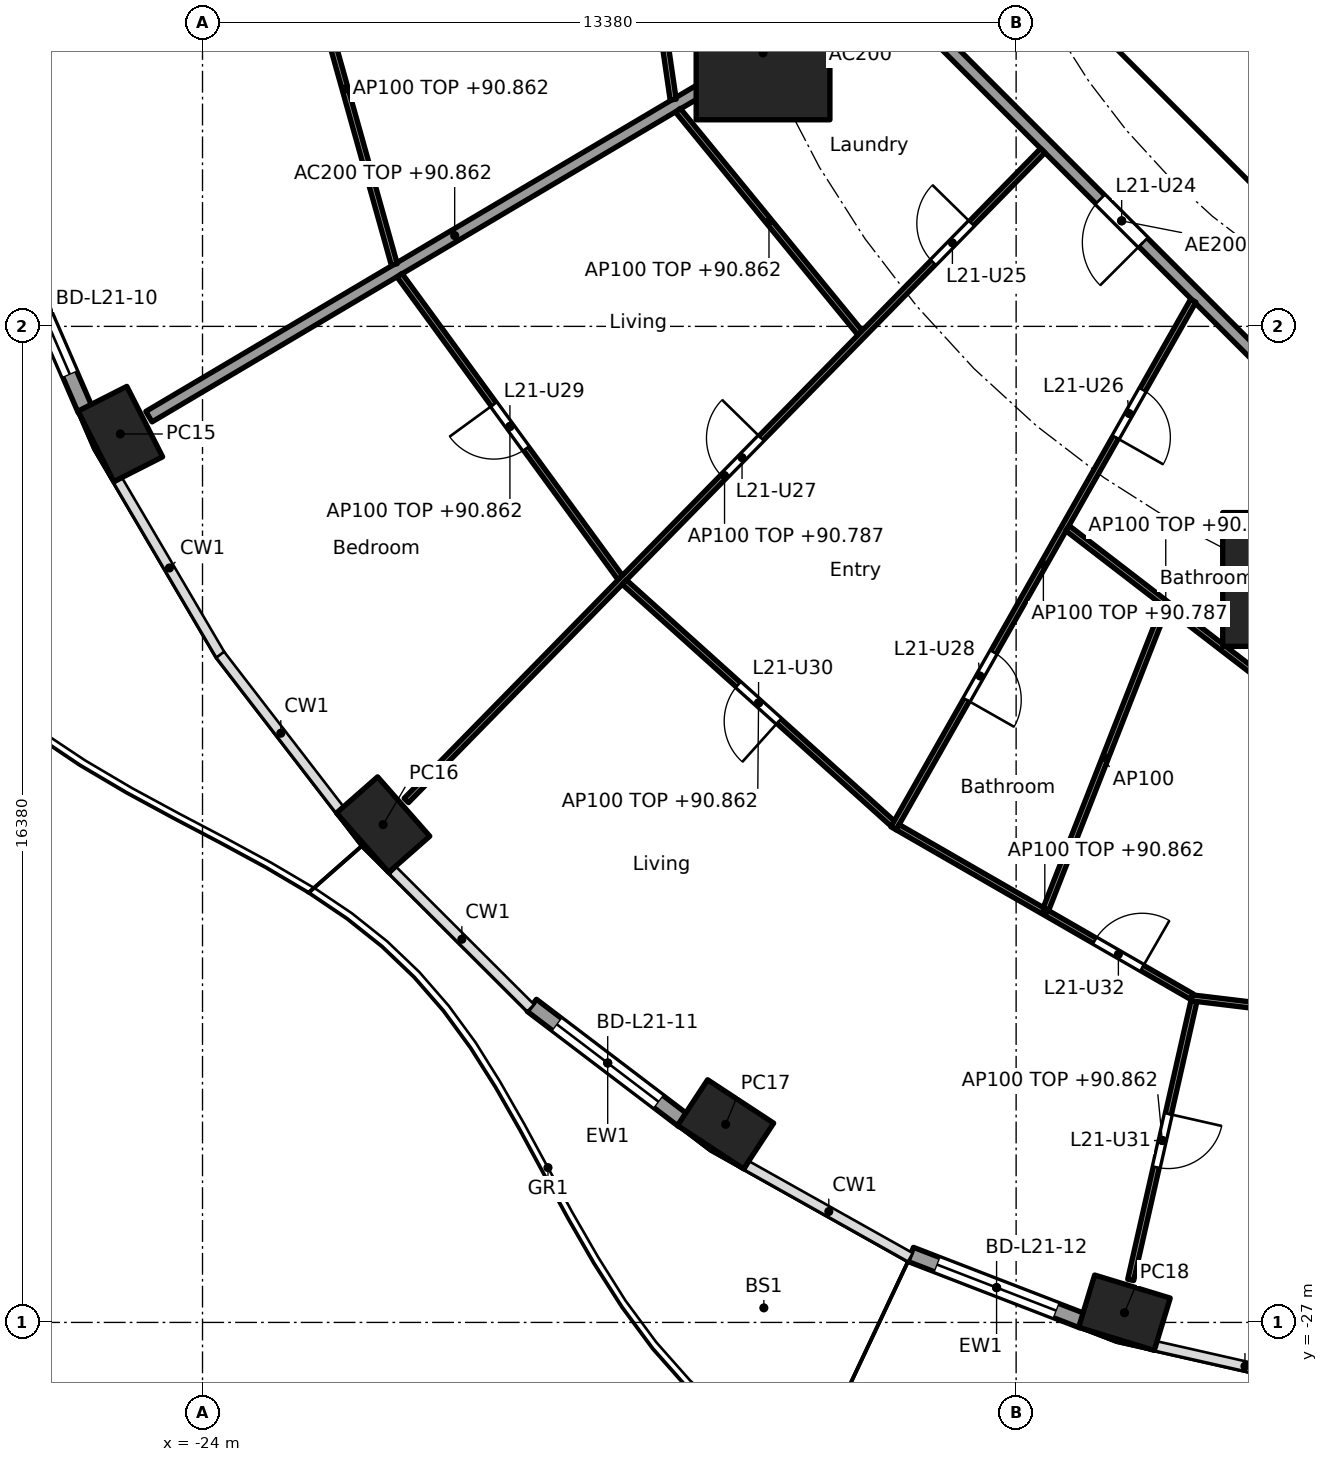
"""IFC4 building model, lengths in metres.
Left out: names, types, materials, properties, quantities, classifications, styles, units other than length and angle.
Written with IfcOpenShell. Run it as: python <this file> out.ifc"""

import sys

from ifc_helpers import new_model, si_unit, direction, frame, frame_2d, origin, origin_2d, place, context, subcontext, project, spatial, rectangle, hollow_rectangle, extrude, element, fill, save


model = new_model("IFC4")
c1 = context("Model", 3, precision=1e-05, world=origin(), true_north=direction((0.0, 1.0)))
c2 = subcontext(c1, "Body", "Model", "MODEL_VIEW")
j1 = project(units=[si_unit("LENGTHUNIT", "METRE"), si_unit("PLANEANGLEUNIT", "RADIAN")], contexts=[c1])
p1 = place(None, origin())
s1 = spatial("IfcSite", under=j1, at=p1, CompositionType="ELEMENT")
p2 = place(p1, origin())
s2 = spatial("IfcBuilding", under=s1, at=p2, CompositionType="ELEMENT")
p3 = place(p2, frame((0.0, 0.0, 88.1)))
s3 = spatial("IfcBuildingStorey", under=s2, at=p3, CompositionType="ELEMENT", Elevation=88.1)
for number, where, z_axis, x_axis in (
    (1, (-25.352, -12.39, 0.0), (0.0, 0.0, 1.0), (0.452, -0.892, 0.0)),
    (2, (-21.03, -18.813, 0.0), (0.0, 0.0, 1.0), (0.66, -0.751, 0.0)),
    (3, (-15.397, -23.742, 0.0), (0.0, 0.0, 1.0), (0.836, -0.549, 0.0)),
    (4, (-8.839, -26.841, 0.0), (0.0, 0.0, 1.0), (0.957, -0.292, 0.0)),
):
    element("IfcColumn", number, at=place(p3, frame(where, z_axis=z_axis, x_axis=x_axis)), inside=s3, PredefinedType="COLUMN", context=c2, shape_type="SweptSolid", body=[
        extrude(hollow_rectangle(XDim=1.3, YDim=0.9, WallThickness=0.045, at=origin_2d()), origin(), (0.0, 0.0, 1.0), 3.7),
    ])
for number, where, z_axis, x_axis in (
    (5, (-14.782, -6.123, 0.0), (0.0, 0.0, 1.0), (1.0, 0.0, 0.0)),
    (6, (-6.123, -14.782, 0.0), (0.0, 0.0, 1.0), (1.0, 0.0, 0.0)),
):
    element("IfcColumn", number, at=place(p3, frame(where, z_axis=z_axis, x_axis=x_axis)), inside=s3, PredefinedType="COLUMN", context=c2, shape_type="SweptSolid", body=[
        extrude(rectangle(XDim=2.2, YDim=2.2, at=origin_2d()), origin(), (0.0, 0.0, 1.0), 3.7),
    ])
p4 = place(p3, frame((-25.928, -11.994, 0.0), z_axis=(0.0, 0.0, 1.0), x_axis=(-0.397682447205, 0.917523117521, 0.0)))
e7 = element("IfcWall", 7, at=p4, inside=s3, PredefinedType="SOLIDWALL", context=c2, shape_type="SweptSolid", body=[
    extrude(rectangle(XDim=3.38, YDim=0.25, at=frame_2d((1.69, 0.0))), origin(), (0.0, 0.0, 1.0), 3.44),
])
p5 = place(p4, frame((0.64, 0.0, 0.0)))
e8 = element("IfcOpeningElement", 8, at=p5, cuts=e7, PredefinedType="OPENING", context=c2, shape_type="SweptSolid", body=[
    extrude(rectangle(XDim=2.1, YDim=2.4, at=frame_2d((1.05, 1.2))), frame((0.0, 0.135, 0.0), z_axis=(0.0, -1.0, 0.0), x_axis=(1.0, 0.0, 0.0)), (0.0, 0.0, 1.0), 0.27),
])
p6 = place(p3, frame((-16.089, -23.682, 0.0), z_axis=(0.0, 0.0, 1.0), x_axis=(-0.796037575978, 0.605247203736, 0.0)))
e9 = element("IfcWall", 9, at=p6, inside=s3, PredefinedType="SOLIDWALL", context=c2, shape_type="SweptSolid", body=[
    extrude(rectangle(XDim=3.134, YDim=0.25, at=frame_2d((1.567, 0.0))), origin(), (0.0, 0.0, 1.0), 3.44),
])
p7 = place(p6, frame((0.517, 0.0, 0.0)))
e10 = element("IfcOpeningElement", 10, at=p7, cuts=e9, PredefinedType="OPENING", context=c2, shape_type="SweptSolid", body=[
    extrude(rectangle(XDim=2.1, YDim=2.4, at=frame_2d((1.05, 1.2))), frame((0.0, 0.135, 0.0), z_axis=(0.0, -1.0, 0.0), x_axis=(1.0, 0.0, 0.0)), (0.0, 0.0, 1.0), 0.27),
])
p8 = place(p3, frame((-9.529, -26.973, 0.0), z_axis=(0.0, 0.0, 1.0), x_axis=(-0.932827091302, 0.360324322982, 0.0)))
e11 = element("IfcWall", 11, at=p8, inside=s3, PredefinedType="SOLIDWALL", context=c2, shape_type="SweptSolid", body=[
    extrude(rectangle(XDim=3.027, YDim=0.25, at=frame_2d((1.514, 0.0))), origin(), (0.0, 0.0, 1.0), 3.44),
])
p9 = place(p8, frame((0.464, 0.0, 0.0)))
e12 = element("IfcOpeningElement", 12, at=p9, cuts=e11, PredefinedType="OPENING", context=c2, shape_type="SweptSolid", body=[
    extrude(rectangle(XDim=2.1, YDim=2.4, at=frame_2d((1.05, 1.2))), frame((0.0, 0.135, 0.0), z_axis=(0.0, -1.0, 0.0), x_axis=(1.0, 0.0, 0.0)), (0.0, 0.0, 1.0), 0.27),
])
p10 = place(p3, frame((-9.988, -4.613, 0.0), z_axis=(0.0, 0.0, 1.0), x_axis=(0.707106781187, -0.707106781187, 0.0)))
e13 = element("IfcWall", 13, at=p10, inside=s3, PredefinedType="SHEAR", context=c2, shape_type="SweptSolid", body=[
    extrude(rectangle(XDim=7.602, YDim=0.6, at=frame_2d((3.801, 0.0))), origin(), (0.0, 0.0, 1.0), 3.44),
])
p11 = place(p10, frame((6.151, 0.0, 0.0)))
e14 = element("IfcOpeningElement", 14, at=p11, cuts=e13, PredefinedType="OPENING", context=c2, shape_type="SweptSolid", body=[
    extrude(rectangle(XDim=1.1, YDim=2.1, at=frame_2d((0.55, 1.05))), frame((0.0, 0.31, 0.0), z_axis=(0.0, -1.0, 0.0), x_axis=(1.0, 0.0, 0.0)), (0.0, 0.0, 1.0), 0.62),
])
p12 = place(p3, frame((-12.657, -5.243, 0.0), z_axis=(0.0, 0.0, 1.0), x_axis=(-0.923876145736, -0.382691608661, 0.0)))
e15 = element("IfcWall", 15, at=p12, inside=s3, PredefinedType="PARTITIONING", context=c2, shape_type="SweptSolid", body=[
    extrude(rectangle(XDim=2.2, YDim=0.2, at=frame_2d((1.1, 0.0))), origin(), (0.0, 0.0, 1.0), 3.44),
])
p13 = place(p3, frame((-14.825, -6.148, 0.0), z_axis=(0.0, 0.0, 1.0), x_axis=(-0.860400431487, -0.509618580408, 0.0)))
e16 = element("IfcWall", 16, at=p13, inside=s3, PredefinedType="PARTITIONING", context=c2, shape_type="SweptSolid", body=[
    extrude(rectangle(XDim=11.688, YDim=0.2, at=frame_2d((5.844, 0.0))), origin(), (0.0, 0.0, 1.0), 2.762),
])
p14 = place(p3, frame((-12.635, -5.134, 0.0), z_axis=(0.0, 0.0, 1.0), x_axis=(0.707106781187, -0.707106781187, 0.0)))
e17 = element("IfcWall", 17, at=p14, inside=s3, PredefinedType="PARTITIONING", context=c2, shape_type="SweptSolid", body=[
    extrude(rectangle(XDim=10.609, YDim=0.2, at=frame_2d((5.305, 0.0))), origin(), (0.0, 0.0, 1.0), 3.44),
])
p15 = place(p14, frame((4.804, 0.0, 0.0)))
e18 = element("IfcOpeningElement", 18, at=p15, cuts=e17, PredefinedType="OPENING", context=c2, shape_type="SweptSolid", body=[
    extrude(rectangle(XDim=1.0, YDim=2.1, at=frame_2d((0.5, 1.05))), frame((0.0, 0.11, 0.0), z_axis=(0.0, -1.0, 0.0), x_axis=(1.0, 0.0, 0.0)), (0.0, 0.0, 1.0), 0.22),
])
p16 = place(p3, frame((-16.888, -2.577, 0.0), z_axis=(0.0, 0.0, 1.0), x_axis=(0.144228053649, -0.989544475272, 0.0)))
e19 = element("IfcWall", 19, at=p16, inside=s3, PredefinedType="PARTITIONING", context=c2, shape_type="SweptSolid", body=[
    extrude(rectangle(XDim=4.359, YDim=0.1, at=frame_2d((2.179, 0.0))), origin(), (0.0, 0.0, 1.0), 2.762),
])
p17 = place(p3, frame((-22.463, -3.832, 0.0), z_axis=(0.0, 0.0, 1.0), x_axis=(0.269805201578, -0.962914925215, 0.0)))
e20 = element("IfcWall", 20, at=p17, inside=s3, PredefinedType="PARTITIONING", context=c2, shape_type="SweptSolid", body=[
    extrude(rectangle(XDim=5.993, YDim=0.1, at=frame_2d((2.997, 0.0))), origin(), (0.0, 0.0, 1.0), 2.762),
])
p18 = place(p3, frame((-16.182, -7.067, 0.0), z_axis=(0.0, 0.0, 1.0), x_axis=(0.633400832951, -0.773823871962, 0.0)))
e21 = element("IfcWall", 21, at=p18, inside=s3, PredefinedType="PARTITIONING", context=c2, shape_type="SweptSolid", body=[
    extrude(rectangle(XDim=4.729, YDim=0.1, at=frame_2d((2.365, 0.0))), origin(), (0.0, 0.0, 1.0), 2.762),
])
p19 = place(p3, frame((-20.76, -9.779, 0.0), z_axis=(0.0, 0.0, 1.0), x_axis=(0.589597019189, -0.807697564045, 0.0)))
e22 = element("IfcWall", 22, at=p19, inside=s3, PredefinedType="PARTITIONING", context=c2, shape_type="SweptSolid", body=[
    extrude(rectangle(XDim=6.158, YDim=0.1, at=frame_2d((3.079, 0.0))), origin(), (0.0, 0.0, 1.0), 2.762),
])
p20 = place(p19, frame((2.629, 0.0, 0.0)))
e23 = element("IfcOpeningElement", 23, at=p20, cuts=e22, PredefinedType="OPENING", context=c2, shape_type="SweptSolid", body=[
    extrude(rectangle(XDim=0.9, YDim=2.1, at=frame_2d((0.45, 1.05))), frame((0.0, 0.06, 0.0), z_axis=(0.0, -1.0, 0.0), x_axis=(1.0, 0.0, 0.0)), (0.0, 0.0, 1.0), 0.12),
])
p21 = place(p3, frame((-10.181, -7.729, 0.0), z_axis=(0.0, 0.0, 1.0), x_axis=(-0.699708106083, -0.714428839201, 0.0)))
e24 = element("IfcWall", 24, at=p21, inside=s3, PredefinedType="PARTITIONING", context=c2, shape_type="SweptSolid", body=[
    extrude(rectangle(XDim=14.959, YDim=0.1, at=frame_2d((7.48, 0.0))), origin(), (0.0, 0.0, 1.0), 2.687),
])
p22 = place(p21, frame((1.675, 0.0, 0.0)))
e25 = element("IfcOpeningElement", 25, at=p22, cuts=e24, PredefinedType="OPENING", context=c2, shape_type="SweptSolid", body=[
    extrude(rectangle(XDim=0.9, YDim=2.1, at=frame_2d((0.45, 1.05))), frame((0.0, 0.06, 0.0), z_axis=(0.0, -1.0, 0.0), x_axis=(1.0, 0.0, 0.0)), (0.0, 0.0, 1.0), 0.12),
])
p23 = place(p21, frame((6.619, 0.0, 0.0)))
e26 = element("IfcOpeningElement", 26, at=p23, cuts=e24, PredefinedType="OPENING", context=c2, shape_type="SweptSolid", body=[
    extrude(rectangle(XDim=0.9, YDim=2.1, at=frame_2d((0.45, 1.05))), frame((0.0, 0.06, 0.0), z_axis=(0.0, -1.0, 0.0), x_axis=(1.0, 0.0, 0.0)), (0.0, 0.0, 1.0), 0.12),
])
p24 = place(p3, frame((-17.063, -14.827, 0.0), z_axis=(0.0, 0.0, 1.0), x_axis=(0.743478142868, -0.668760234373, 0.0)))
e27 = element("IfcWall", 27, at=p24, inside=s3, PredefinedType="PARTITIONING", context=c2, shape_type="SweptSolid", body=[
    extrude(rectangle(XDim=5.937, YDim=0.1, at=frame_2d((2.969, 0.0))), origin(), (0.0, 0.0, 1.0), 2.762),
])
p25 = place(p24, frame((2.519, 0.0, 0.0)))
e28 = element("IfcOpeningElement", 28, at=p25, cuts=e27, PredefinedType="OPENING", context=c2, shape_type="SweptSolid", body=[
    extrude(rectangle(XDim=0.9, YDim=2.1, at=frame_2d((0.45, 1.05))), frame((0.0, 0.06, 0.0), z_axis=(0.0, -1.0, 0.0), x_axis=(1.0, 0.0, 0.0)), (0.0, 0.0, 1.0), 0.12),
])
p26 = place(p3, frame((-7.707, -10.198, 0.0), z_axis=(0.0, 0.0, 1.0), x_axis=(-0.493963587489, -0.869482589955, 0.0)))
e29 = element("IfcWall", 29, at=p26, inside=s3, PredefinedType="PARTITIONING", context=c2, shape_type="SweptSolid", body=[
    extrude(rectangle(XDim=9.978, YDim=0.1, at=frame_2d((4.989, 0.0))), origin(), (0.0, 0.0, 1.0), 2.687),
])
p27 = place(p26, frame((1.684, 0.0, 0.0)))
e30 = element("IfcOpeningElement", 30, at=p27, cuts=e29, PredefinedType="OPENING", context=c2, shape_type="SweptSolid", body=[
    extrude(rectangle(XDim=0.9, YDim=2.1, at=frame_2d((0.45, 1.05))), frame((0.0, 0.06, 0.0), z_axis=(0.0, -1.0, 0.0), x_axis=(1.0, 0.0, 0.0)), (0.0, 0.0, 1.0), 0.12),
])
p28 = place(p26, frame((6.648, 0.0, 0.0)))
e31 = element("IfcOpeningElement", 31, at=p28, cuts=e29, PredefinedType="OPENING", context=c2, shape_type="SweptSolid", body=[
    extrude(rectangle(XDim=0.9, YDim=2.1, at=frame_2d((0.45, 1.05))), frame((0.0, 0.06, 0.0), z_axis=(0.0, -1.0, 0.0), x_axis=(1.0, 0.0, 0.0)), (0.0, 0.0, 1.0), 0.12),
])
p29 = place(p3, frame((-9.775, -13.939, 0.0), z_axis=(0.0, 0.0, 1.0), x_axis=(0.792156642473, -0.61031783014, 0.0)))
e32 = element("IfcWall", 32, at=p29, inside=s3, PredefinedType="PARTITIONING", context=c2, shape_type="SweptSolid", body=[
    extrude(rectangle(XDim=4.08, YDim=0.1, at=frame_2d((2.04, 0.0))), origin(), (0.0, 0.0, 1.0), 2.762),
])
p30 = place(p3, frame((-12.568, -18.856, 0.0), z_axis=(0.0, 0.0, 1.0), x_axis=(0.866532513598, -0.499120629585, 0.0)))
e33 = element("IfcWall", 33, at=p30, inside=s3, PredefinedType="PARTITIONING", context=c2, shape_type="SweptSolid", body=[
    extrude(rectangle(XDim=5.585, YDim=0.1, at=frame_2d((2.792, 0.0))), origin(), (0.0, 0.0, 1.0), 2.762),
])
p31 = place(p30, frame((3.739, 0.0, 0.0)))
e34 = element("IfcOpeningElement", 34, at=p31, cuts=e33, PredefinedType="OPENING", context=c2, shape_type="SweptSolid", body=[
    extrude(rectangle(XDim=0.9, YDim=2.1, at=frame_2d((0.45, 1.05))), frame((0.0, 0.06, 0.0), z_axis=(0.0, -1.0, 0.0), x_axis=(1.0, 0.0, 0.0)), (0.0, 0.0, 1.0), 0.12),
])
p32 = place(p3, frame((-8.177, -15.231, 0.0), z_axis=(0.0, 0.0, 1.0), x_axis=(-0.365520869553, -0.930803144559, 0.0)))
e35 = element("IfcWall", 35, at=p32, inside=s3, PredefinedType="PARTITIONING", context=c2, shape_type="SweptSolid", body=[
    extrude(rectangle(XDim=5.342, YDim=0.1, at=frame_2d((2.671, 0.0))), origin(), (0.0, 0.0, 1.0), 3.44),
])
p33 = place(p3, frame((-7.696, -21.717, 0.0), z_axis=(0.0, 0.0, 1.0), x_axis=(-0.221196717441, -0.97522921008, 0.0)))
e36 = element("IfcWall", 36, at=p33, inside=s3, PredefinedType="PARTITIONING", context=c2, shape_type="SweptSolid", body=[
    extrude(rectangle(XDim=4.7, YDim=0.1, at=frame_2d((2.35, 0.0))), origin(), (0.0, 0.0, 1.0), 2.762),
])
p34 = place(p33, frame((1.9, 0.0, 0.0)))
e37 = element("IfcOpeningElement", 37, at=p34, cuts=e36, PredefinedType="OPENING", context=c2, shape_type="SweptSolid", body=[
    extrude(rectangle(XDim=0.9, YDim=2.1, at=frame_2d((0.45, 1.05))), frame((0.0, 0.06, 0.0), z_axis=(0.0, -1.0, 0.0), x_axis=(1.0, 0.0, 0.0)), (0.0, 0.0, 1.0), 0.12),
])
p35 = place(p3, frame((-7.735, -21.662, 0.0), z_axis=(0.0, 0.0, 1.0), x_axis=(0.992808347289, -0.119714600421, 0.0)))
e38 = element("IfcWall", 38, at=p35, inside=s3, PredefinedType="PARTITIONING", context=c2, shape_type="SweptSolid", body=[
    extrude(rectangle(XDim=6.053, YDim=0.1, at=frame_2d((3.026, 0.0))), origin(), (0.0, 0.0, 1.0), 2.762),
])
p36 = place(p5, origin())
e39 = element("IfcDoor", 39, at=p36, inside=s3, OperationType="SLIDING_TO_LEFT", PredefinedType="DOOR", context=c2, shape_type="SweptSolid", body=[
    extrude(rectangle(XDim=2.1, YDim=2.4, at=frame_2d((1.05, 1.2))), frame((0.0, 0.025, 0.0), z_axis=(0.0, -1.0, 0.0), x_axis=(1.0, 0.0, 0.0)), (0.0, 0.0, 1.0), 0.05),
])
fill(e8, e39)
p37 = place(p7, origin())
e40 = element("IfcDoor", 40, at=p37, inside=s3, OperationType="SLIDING_TO_LEFT", PredefinedType="DOOR", context=c2, shape_type="SweptSolid", body=[
    extrude(rectangle(XDim=2.1, YDim=2.4, at=frame_2d((1.05, 1.2))), frame((0.0, 0.025, 0.0), z_axis=(0.0, -1.0, 0.0), x_axis=(1.0, 0.0, 0.0)), (0.0, 0.0, 1.0), 0.05),
])
fill(e10, e40)
p38 = place(p9, origin())
e41 = element("IfcDoor", 41, at=p38, inside=s3, OperationType="SLIDING_TO_LEFT", PredefinedType="DOOR", context=c2, shape_type="SweptSolid", body=[
    extrude(rectangle(XDim=2.1, YDim=2.4, at=frame_2d((1.05, 1.2))), frame((0.0, 0.025, 0.0), z_axis=(0.0, -1.0, 0.0), x_axis=(1.0, 0.0, 0.0)), (0.0, 0.0, 1.0), 0.05),
])
fill(e12, e41)
p39 = place(p15, frame((1.0, 0.0, 0.0), x_axis=(-1.0, 0.0, 0.0)))
e42 = element("IfcDoor", 42, at=p39, inside=s3, OperationType="SINGLE_SWING_LEFT", PredefinedType="DOOR", context=c2, shape_type="SweptSolid", body=[
    extrude(rectangle(XDim=1.0, YDim=2.1, at=frame_2d((0.5, 1.05))), frame((0.0, 0.025, 0.0), z_axis=(0.0, -1.0, 0.0), x_axis=(1.0, 0.0, 0.0)), (0.0, 0.0, 1.0), 0.05),
])
fill(e18, e42)
p40 = place(p22, frame((0.9, 0.0, 0.0), x_axis=(-1.0, 0.0, 0.0)))
e43 = element("IfcDoor", 43, at=p40, inside=s3, OperationType="SINGLE_SWING_RIGHT", PredefinedType="DOOR", context=c2, shape_type="SweptSolid", body=[
    extrude(rectangle(XDim=0.9, YDim=2.1, at=frame_2d((0.45, 1.05))), frame((0.0, 0.025, 0.0), z_axis=(0.0, -1.0, 0.0), x_axis=(1.0, 0.0, 0.0)), (0.0, 0.0, 1.0), 0.05),
])
fill(e25, e43)
p41 = place(p27, origin())
e44 = element("IfcDoor", 44, at=p41, inside=s3, OperationType="SINGLE_SWING_RIGHT", PredefinedType="DOOR", context=c2, shape_type="SweptSolid", body=[
    extrude(rectangle(XDim=0.9, YDim=2.1, at=frame_2d((0.45, 1.05))), frame((0.0, 0.025, 0.0), z_axis=(0.0, -1.0, 0.0), x_axis=(1.0, 0.0, 0.0)), (0.0, 0.0, 1.0), 0.05),
])
fill(e30, e44)
p42 = place(p23, frame((0.9, 0.0, 0.0), x_axis=(-1.0, 0.0, 0.0)))
e45 = element("IfcDoor", 45, at=p42, inside=s3, OperationType="SINGLE_SWING_RIGHT", PredefinedType="DOOR", context=c2, shape_type="SweptSolid", body=[
    extrude(rectangle(XDim=0.9, YDim=2.1, at=frame_2d((0.45, 1.05))), frame((0.0, 0.025, 0.0), z_axis=(0.0, -1.0, 0.0), x_axis=(1.0, 0.0, 0.0)), (0.0, 0.0, 1.0), 0.05),
])
fill(e26, e45)
p43 = place(p28, origin())
e46 = element("IfcDoor", 46, at=p43, inside=s3, OperationType="SINGLE_SWING_RIGHT", PredefinedType="DOOR", context=c2, shape_type="SweptSolid", body=[
    extrude(rectangle(XDim=0.9, YDim=2.1, at=frame_2d((0.45, 1.05))), frame((0.0, 0.025, 0.0), z_axis=(0.0, -1.0, 0.0), x_axis=(1.0, 0.0, 0.0)), (0.0, 0.0, 1.0), 0.05),
])
fill(e31, e46)
p44 = place(p20, frame((0.9, 0.0, 0.0), x_axis=(-1.0, 0.0, 0.0)))
e47 = element("IfcDoor", 47, at=p44, inside=s3, OperationType="SINGLE_SWING_RIGHT", PredefinedType="DOOR", context=c2, shape_type="SweptSolid", body=[
    extrude(rectangle(XDim=0.9, YDim=2.1, at=frame_2d((0.45, 1.05))), frame((0.0, 0.025, 0.0), z_axis=(0.0, -1.0, 0.0), x_axis=(1.0, 0.0, 0.0)), (0.0, 0.0, 1.0), 0.05),
])
fill(e23, e47)
p45 = place(p25, frame((0.9, 0.0, 0.0), x_axis=(-1.0, 0.0, 0.0)))
e48 = element("IfcDoor", 48, at=p45, inside=s3, OperationType="SINGLE_SWING_LEFT", PredefinedType="DOOR", context=c2, shape_type="SweptSolid", body=[
    extrude(rectangle(XDim=0.9, YDim=2.1, at=frame_2d((0.45, 1.05))), frame((0.0, 0.025, 0.0), z_axis=(0.0, -1.0, 0.0), x_axis=(1.0, 0.0, 0.0)), (0.0, 0.0, 1.0), 0.05),
])
fill(e28, e48)
p46 = place(p34, origin())
e49 = element("IfcDoor", 49, at=p46, inside=s3, OperationType="SINGLE_SWING_LEFT", PredefinedType="DOOR", context=c2, shape_type="SweptSolid", body=[
    extrude(rectangle(XDim=0.9, YDim=2.1, at=frame_2d((0.45, 1.05))), frame((0.0, 0.025, 0.0), z_axis=(0.0, -1.0, 0.0), x_axis=(1.0, 0.0, 0.0)), (0.0, 0.0, 1.0), 0.05),
])
fill(e37, e49)
p47 = place(p31, origin())
e50 = element("IfcDoor", 50, at=p47, inside=s3, OperationType="SINGLE_SWING_RIGHT", PredefinedType="DOOR", context=c2, shape_type="SweptSolid", body=[
    extrude(rectangle(XDim=0.9, YDim=2.1, at=frame_2d((0.45, 1.05))), frame((0.0, 0.025, 0.0), z_axis=(0.0, -1.0, 0.0), x_axis=(1.0, 0.0, 0.0)), (0.0, 0.0, 1.0), 0.05),
])
fill(e34, e50)
save(model, sys.argv[1])
